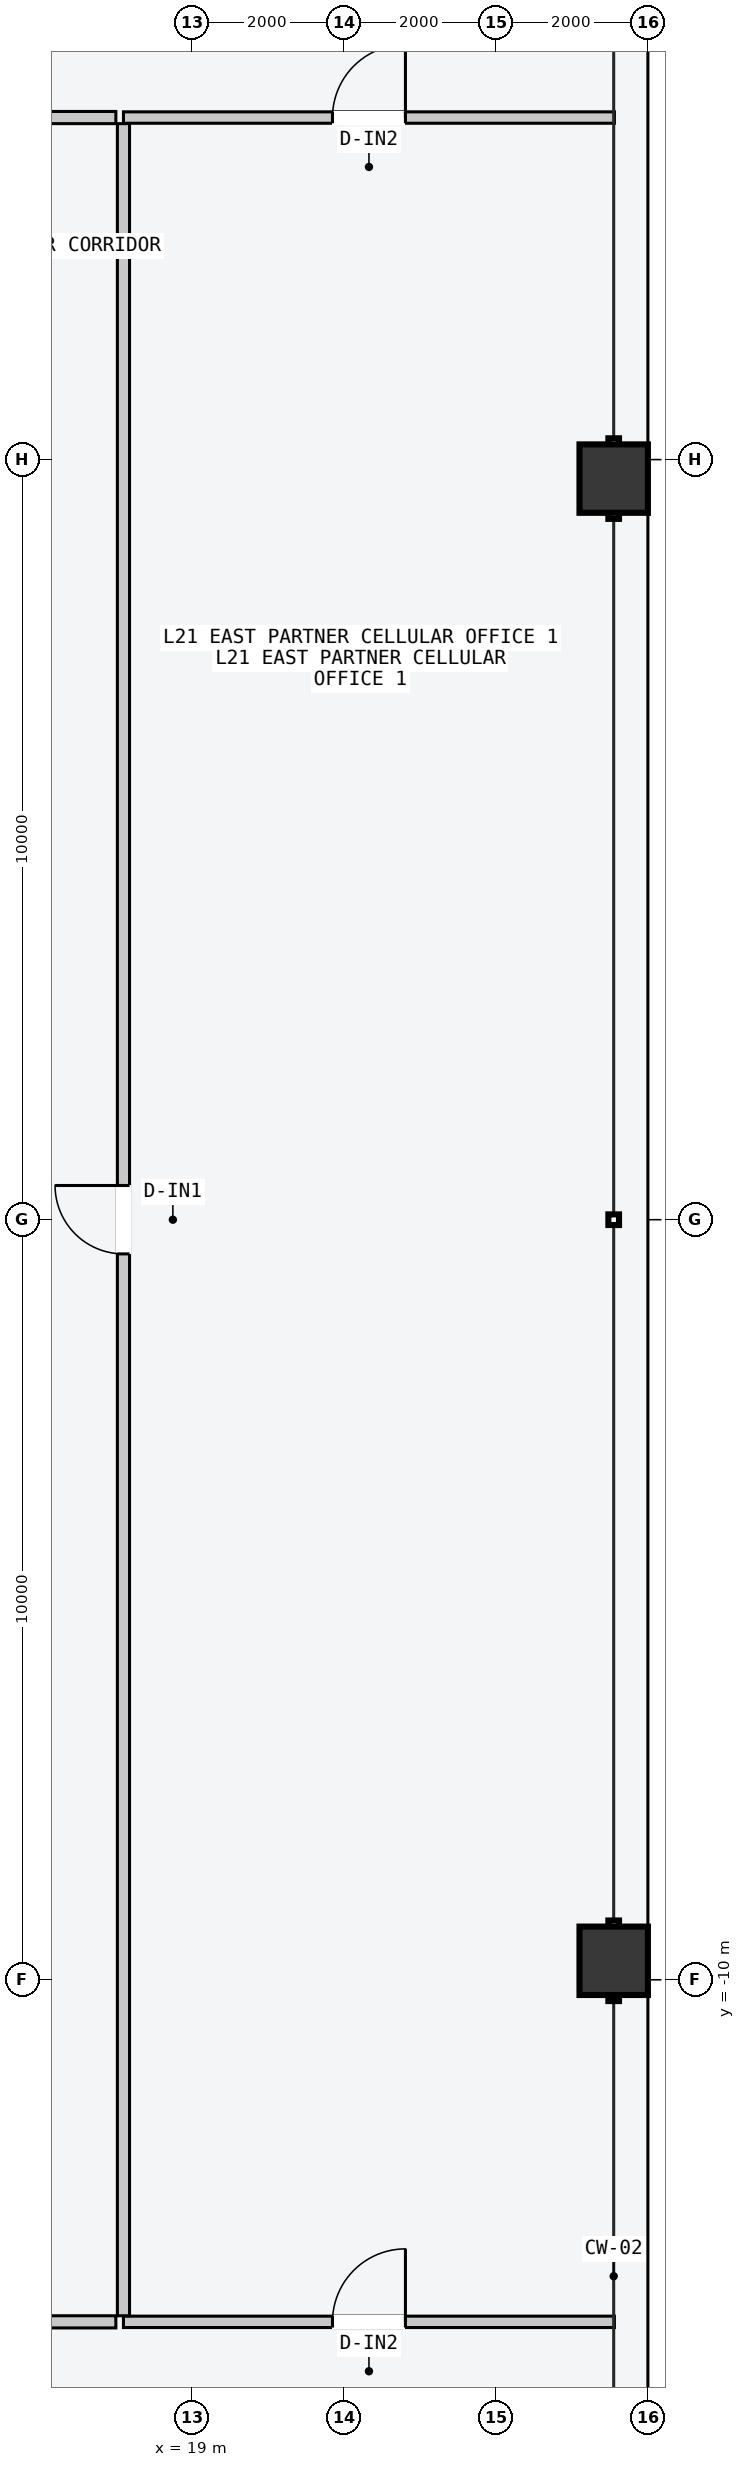
"""IFC4 building model, lengths in metres.
Left out: names, types, materials, properties, quantities, classifications, styles, units other than length and angle.
Written with IfcOpenShell. Run it as: python <this file> out.ifc"""

import sys

from ifc_helpers import new_model, si_unit, direction, frame, frame_2d, origin, origin_2d, place, context, subcontext, project, spatial, rectangle, hollow_rectangle, extrude, element, fill, save


model = new_model("IFC4")
c1 = context("Model", 3, precision=1e-05, world=origin(), true_north=direction((0.0, 1.0)))
c2 = subcontext(c1, "Body", "Model", "MODEL_VIEW")
j1 = project(units=[si_unit("LENGTHUNIT", "METRE"), si_unit("PLANEANGLEUNIT", "RADIAN")], contexts=[c1])
p1 = place(None, origin())
s1 = spatial("IfcSite", under=j1, at=p1, CompositionType="ELEMENT")
p2 = place(p1, origin())
s2 = spatial("IfcBuilding", under=s1, at=p2, CompositionType="ELEMENT")
p3 = place(p2, frame((0.0, 0.0, 82.8)))
s3 = spatial("IfcBuildingStorey", under=s2, at=p3, CompositionType="ELEMENT", Elevation=82.8)
for number, where, z_axis, x_axis in (
    (1, (24.55, -9.75, 0.0), (0.0, 0.0, 1.0), (0.0, 1.0, 0.0)),
    (2, (24.55, 9.75, 0.0), (0.0, 0.0, 1.0), (0.0, 1.0, 0.0)),
):
    element("IfcColumn", number, at=place(p3, frame(where, z_axis=z_axis, x_axis=x_axis)), inside=s3, PredefinedType="COLUMN", context=c2, shape_type="SweptSolid", body=[
        extrude(hollow_rectangle(XDim=0.9, YDim=0.9, WallThickness=0.045, at=origin_2d()), origin(), (0.0, 0.0, 1.0), 4.5),
    ])
p4 = place(p3, frame((-18.0, 14.5, 0.0), z_axis=(0.0, 0.0, 1.0), x_axis=(1.0, 0.0, 0.0)))
e3 = element("IfcWall", 3, at=p4, inside=s3, PredefinedType="PARTITIONING", context=c2, shape_type="SweptSolid", body=[
    extrude(rectangle(XDim=36.0, YDim=0.16, at=frame_2d((18.0, 0.0))), origin(), (0.0, 0.0, 1.0), 4.3),
])
p5 = place(p4, frame((3.92, 0.0, 0.0)))
e4 = element("IfcOpeningElement", 4, at=p5, cuts=e3, PredefinedType="OPENING", context=c2, shape_type="SweptSolid", body=[
    extrude(rectangle(XDim=1.4, YDim=2.2, at=frame_2d((0.7, 1.1))), frame((0.0, 0.09, 0.0), z_axis=(0.0, -1.0, 0.0), x_axis=(1.0, 0.0, 0.0)), (0.0, 0.0, 1.0), 0.18),
])
p6 = place(p4, frame((17.749, 0.0, 0.0)))
e5 = element("IfcOpeningElement", 5, at=p6, cuts=e3, PredefinedType="OPENING", context=c2, shape_type="SweptSolid", body=[
    extrude(rectangle(XDim=0.9, YDim=2.15, at=frame_2d((0.45, 1.075))), frame((0.0, 0.09, 0.0), z_axis=(0.0, -1.0, 0.0), x_axis=(1.0, 0.0, 0.0)), (0.0, 0.0, 1.0), 0.18),
])
p7 = place(p4, frame((31.099, 0.0, 0.0)))
e6 = element("IfcOpeningElement", 6, at=p7, cuts=e3, PredefinedType="OPENING", context=c2, shape_type="SweptSolid", body=[
    extrude(rectangle(XDim=0.96, YDim=2.18, at=frame_2d((0.48, 1.09))), frame((0.0, 0.09, 0.0), z_axis=(0.0, -1.0, 0.0), x_axis=(1.0, 0.0, 0.0)), (0.0, 0.0, 1.0), 0.18),
])
p8 = place(p3, frame((18.1, 14.5, 0.0), z_axis=(0.0, 0.0, 1.0), x_axis=(1.0, 0.0, 0.0)))
e7 = element("IfcWall", 7, at=p8, inside=s3, PredefinedType="PARTITIONING", context=c2, shape_type="SweptSolid", body=[
    extrude(rectangle(XDim=6.46, YDim=0.15, at=frame_2d((3.23, 0.0))), origin(), (0.0, 0.0, 1.0), 4.3),
])
p9 = place(p8, frame((2.75, 0.0, 0.0)))
e8 = element("IfcOpeningElement", 8, at=p9, cuts=e7, PredefinedType="OPENING", context=c2, shape_type="SweptSolid", body=[
    extrude(rectangle(XDim=0.96, YDim=2.18, at=frame_2d((0.48, 1.09))), frame((0.0, 0.085, 0.0), z_axis=(0.0, -1.0, 0.0), x_axis=(1.0, 0.0, 0.0)), (0.0, 0.0, 1.0), 0.17),
])
p10 = place(p3, frame((-18.0, -14.5, 0.0), z_axis=(0.0, 0.0, 1.0), x_axis=(1.0, 0.0, 0.0)))
e9 = element("IfcWall", 9, at=p10, inside=s3, PredefinedType="PARTITIONING", context=c2, shape_type="SweptSolid", body=[
    extrude(rectangle(XDim=36.0, YDim=0.16, at=frame_2d((18.0, 0.0))), origin(), (0.0, 0.0, 1.0), 4.3),
])
p11 = place(p10, frame((1.721, 0.0, 0.0)))
e10 = element("IfcOpeningElement", 10, at=p11, cuts=e9, PredefinedType="OPENING", context=c2, shape_type="SweptSolid", body=[
    extrude(rectangle(XDim=1.02, YDim=2.2, at=frame_2d((0.51, 1.1))), frame((0.0, 0.09, 0.0), z_axis=(0.0, -1.0, 0.0), x_axis=(1.0, 0.0, 0.0)), (0.0, 0.0, 1.0), 0.18),
])
p12 = place(p10, frame((7.515, 0.0, 0.0)))
e11 = element("IfcOpeningElement", 11, at=p12, cuts=e9, PredefinedType="OPENING", context=c2, shape_type="SweptSolid", body=[
    extrude(rectangle(XDim=1.06, YDim=2.2, at=frame_2d((0.53, 1.1))), frame((0.0, 0.09, 0.0), z_axis=(0.0, -1.0, 0.0), x_axis=(1.0, 0.0, 0.0)), (0.0, 0.0, 1.0), 0.18),
])
p13 = place(p10, frame((14.991, 0.0, 0.0)))
e12 = element("IfcOpeningElement", 12, at=p13, cuts=e9, PredefinedType="OPENING", context=c2, shape_type="SweptSolid", body=[
    extrude(rectangle(XDim=1.24, YDim=2.24, at=frame_2d((0.62, 1.12))), frame((0.0, 0.09, 0.0), z_axis=(0.0, -1.0, 0.0), x_axis=(1.0, 0.0, 0.0)), (0.0, 0.0, 1.0), 0.18),
])
p14 = place(p10, frame((23.273, 0.0, 0.0)))
e13 = element("IfcOpeningElement", 13, at=p14, cuts=e9, PredefinedType="OPENING", context=c2, shape_type="SweptSolid", body=[
    extrude(rectangle(XDim=1.4, YDim=2.2, at=frame_2d((0.7, 1.1))), frame((0.0, 0.09, 0.0), z_axis=(0.0, -1.0, 0.0), x_axis=(1.0, 0.0, 0.0)), (0.0, 0.0, 1.0), 0.18),
])
p15 = place(p10, frame((31.727, 0.0, 0.0)))
e14 = element("IfcOpeningElement", 14, at=p15, cuts=e9, PredefinedType="OPENING", context=c2, shape_type="SweptSolid", body=[
    extrude(rectangle(XDim=0.9, YDim=2.15, at=frame_2d((0.45, 1.075))), frame((0.0, 0.09, 0.0), z_axis=(0.0, -1.0, 0.0), x_axis=(1.0, 0.0, 0.0)), (0.0, 0.0, 1.0), 0.18),
])
p16 = place(p3, frame((18.1, -14.5, 0.0), z_axis=(0.0, 0.0, 1.0), x_axis=(1.0, 0.0, 0.0)))
e15 = element("IfcWall", 15, at=p16, inside=s3, PredefinedType="PARTITIONING", context=c2, shape_type="SweptSolid", body=[
    extrude(rectangle(XDim=6.46, YDim=0.15, at=frame_2d((3.23, 0.0))), origin(), (0.0, 0.0, 1.0), 4.3),
])
p17 = place(p16, frame((2.75, 0.0, 0.0)))
e16 = element("IfcOpeningElement", 16, at=p17, cuts=e15, PredefinedType="OPENING", context=c2, shape_type="SweptSolid", body=[
    extrude(rectangle(XDim=0.96, YDim=2.18, at=frame_2d((0.48, 1.09))), frame((0.0, 0.085, 0.0), z_axis=(0.0, -1.0, 0.0), x_axis=(1.0, 0.0, 0.0)), (0.0, 0.0, 1.0), 0.17),
])
p18 = place(p3, frame((18.1, -14.42, 0.0), z_axis=(0.0, 0.0, 1.0), x_axis=(0.0, 1.0, 0.0)))
e17 = element("IfcWall", 17, at=p18, inside=s3, PredefinedType="PARTITIONING", context=c2, shape_type="SweptSolid", body=[
    extrude(rectangle(XDim=28.84, YDim=0.16, at=frame_2d((14.42, 0.0))), origin(), (0.0, 0.0, 1.0), 2.64),
])
p19 = place(p18, frame((13.97, 0.0, 0.0)))
e18 = element("IfcOpeningElement", 18, at=p19, cuts=e17, PredefinedType="OPENING", context=c2, shape_type="SweptSolid", body=[
    extrude(rectangle(XDim=0.9, YDim=2.15, at=frame_2d((0.45, 1.075))), frame((0.0, 0.09, 0.0), z_axis=(0.0, -1.0, 0.0), x_axis=(1.0, 0.0, 0.0)), (0.0, 0.0, 1.0), 0.18),
])
p20 = place(p9, origin())
e19 = element("IfcDoor", 19, at=p20, inside=s3, OperationType="SINGLE_SWING_RIGHT", PredefinedType="DOOR", context=c2, shape_type="SweptSolid", body=[
    extrude(rectangle(XDim=0.96, YDim=2.18, at=frame_2d((0.48, 1.09))), frame((0.0, 0.025, 0.0), z_axis=(0.0, -1.0, 0.0), x_axis=(1.0, 0.0, 0.0)), (0.0, 0.0, 1.0), 0.05),
])
fill(e8, e19)
p21 = place(p17, origin())
e20 = element("IfcDoor", 20, at=p21, inside=s3, OperationType="SINGLE_SWING_RIGHT", PredefinedType="DOOR", context=c2, shape_type="SweptSolid", body=[
    extrude(rectangle(XDim=0.96, YDim=2.18, at=frame_2d((0.48, 1.09))), frame((0.0, 0.025, 0.0), z_axis=(0.0, -1.0, 0.0), x_axis=(1.0, 0.0, 0.0)), (0.0, 0.0, 1.0), 0.05),
])
fill(e16, e20)
p22 = place(p19, origin())
e21 = element("IfcDoor", 21, at=p22, inside=s3, OperationType="SINGLE_SWING_RIGHT", PredefinedType="DOOR", context=c2, shape_type="SweptSolid", body=[
    extrude(rectangle(XDim=0.9, YDim=2.15, at=frame_2d((0.45, 1.075))), frame((0.0, 0.025, 0.0), z_axis=(0.0, -1.0, 0.0), x_axis=(1.0, 0.0, 0.0)), (0.0, 0.0, 1.0), 0.05),
])
fill(e18, e21)
save(model, sys.argv[1])
